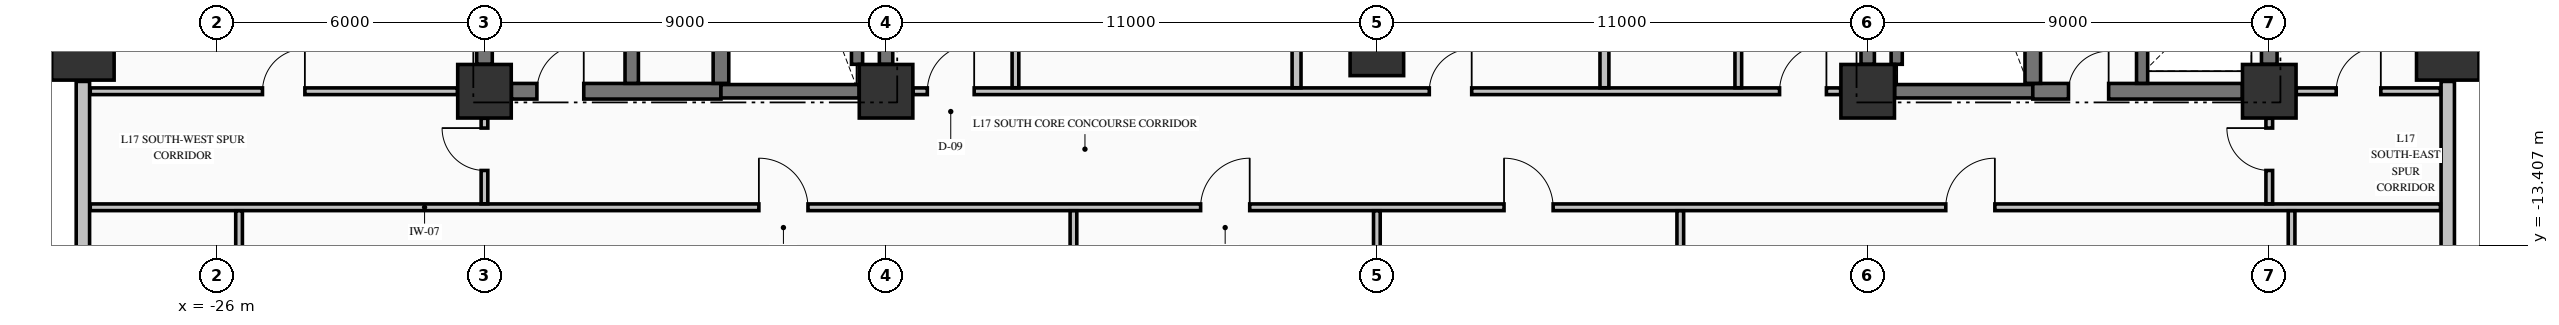
"""IFC4 building model, lengths in metres.
Left out: names, types, materials, properties, quantities, classifications, styles, units other than length and angle.
Written with IfcOpenShell. Run it as: python <this file> out.ifc"""

import sys

from ifc_helpers import new_model, si_unit, direction, frame, frame_2d, origin, origin_2d, place, context, subcontext, project, spatial, rectangle, extrude, element, fill, save


model = new_model("IFC4")
c1 = context("Model", 3, precision=1e-05, world=origin(), true_north=direction((0.0, 1.0)))
c2 = subcontext(c1, "Body", "Model", "MODEL_VIEW")
j1 = project(units=[si_unit("LENGTHUNIT", "METRE"), si_unit("PLANEANGLEUNIT", "RADIAN")], contexts=[c1])
p1 = place(None, origin())
s1 = spatial("IfcSite", under=j1, at=p1, CompositionType="ELEMENT")
p2 = place(p1, origin())
s2 = spatial("IfcBuilding", under=s1, at=p2, CompositionType="ELEMENT")
p3 = place(p2, frame((0.0, 0.0, 71.47)))
s3 = spatial("IfcBuildingStorey", under=s2, at=p3, CompositionType="ELEMENT", Elevation=71.47)
for number, where, z_axis, x_axis in (
    (1, (-29.0, -9.0, -0.325), (0.0, 0.0, 1.0), (1.0, 0.0, 0.0)),
    (2, (24.0, -9.0, -0.325), (0.0, 0.0, 1.0), (1.0, 0.0, 0.0)),
):
    element("IfcColumn", number, at=place(p3, frame(where, z_axis=z_axis, x_axis=x_axis)), inside=s3, PredefinedType="COLUMN", context=c2, shape_type="SweptSolid", body=[
        extrude(rectangle(XDim=1.4, YDim=1.4, at=origin_2d()), origin(), (0.0, 0.0, 1.0), 3.645),
    ])
for number, where, z_axis, x_axis in (
    (3, (-20.0, -9.95, -0.325), (0.0, 0.0, 1.0), (1.0, 0.0, 0.0)),
    (4, (-11.0, -9.95, -0.325), (0.0, 0.0, 1.0), (1.0, 0.0, 0.0)),
    (5, (11.0, -9.95, -0.325), (0.0, 0.0, 1.0), (1.0, 0.0, 0.0)),
    (6, (20.0, -9.95, -0.325), (0.0, 0.0, 1.0), (1.0, 0.0, 0.0)),
    (7, (0.0, -9.0, -0.325), (0.0, 0.0, 1.0), (1.0, 0.0, 0.0)),
):
    element("IfcColumn", number, at=place(p3, frame(where, z_axis=z_axis, x_axis=x_axis)), inside=s3, PredefinedType="COLUMN", context=c2, shape_type="SweptSolid", body=[
        extrude(rectangle(XDim=1.2, YDim=1.2, at=origin_2d()), origin(), (0.0, 0.0, 1.0), 3.645),
    ])
for number, where, z_axis, x_axis in (
    (8, (24.0, -22.27, 0.0), (0.0, 0.0, 1.0), (0.0, 1.0, 0.0)),
    (9, (-29.0, -9.73, 0.0), (0.0, 0.0, 1.0), (0.0, -1.0, 0.0)),
):
    element("IfcWall", number, at=place(p3, frame(where, z_axis=z_axis, x_axis=x_axis)), inside=s3, PredefinedType="STANDARD", context=c2, shape_type="SweptSolid", body=[
        extrude(rectangle(XDim=12.54, YDim=0.3, at=frame_2d((6.27, 0.0))), origin(), (0.0, 0.0, 1.0), 2.712),
    ])
p4 = place(p3, frame((-19.396, -9.95, 0.0), z_axis=(0.0, 0.0, 1.0), x_axis=(1.0, 0.0, 0.0)))
e10 = element("IfcWall", 10, at=p4, inside=s3, PredefinedType="SHEAR", context=c2, shape_type="SweptSolid", body=[
    extrude(rectangle(XDim=4.696, YDim=0.35, at=frame_2d((2.348, 0.0))), origin(), (0.0, 0.0, 1.0), 3.32),
])
p5 = place(p4, frame((0.571, 0.0, 0.0)))
e11 = element("IfcOpeningElement", 11, at=p5, cuts=e10, PredefinedType="OPENING", context=c2, shape_type="SweptSolid", body=[
    extrude(rectangle(XDim=1.05, YDim=2.15, at=frame_2d((0.525, 1.075))), frame((0.0, 0.185, 0.0), z_axis=(0.0, -1.0, 0.0), x_axis=(1.0, 0.0, 0.0)), (0.0, 0.0, 1.0), 0.37),
])
for number, where, z_axis, x_axis in (
    (12, (-14.7, -9.95, 0.0), (0.0, 0.0, 1.0), (1.0, 0.0, 0.0)),
    (13, (11.604, -9.95, 0.0), (0.0, 0.0, 1.0), (1.0, 0.0, 0.0)),
):
    element("IfcWall", number, at=place(p3, frame(where, z_axis=z_axis, x_axis=x_axis)), inside=s3, PredefinedType="SHEAR", context=c2, shape_type="SweptSolid", body=[
        extrude(rectangle(XDim=3.096, YDim=0.3, at=frame_2d((1.548, 0.0))), origin(), (0.0, 0.0, 1.0), 3.32),
    ])
p6 = place(p3, frame((14.7, -9.95, 0.0), z_axis=(0.0, 0.0, 1.0), x_axis=(1.0, 0.0, 0.0)))
e14 = element("IfcWall", 14, at=p6, inside=s3, PredefinedType="SHEAR", context=c2, shape_type="SweptSolid", body=[
    extrude(rectangle(XDim=4.696, YDim=0.35, at=frame_2d((2.348, 0.0))), origin(), (0.0, 0.0, 1.0), 3.32),
])
p7 = place(p6, frame((0.8, 0.0, 0.0)))
e15 = element("IfcOpeningElement", 15, at=p7, cuts=e14, PredefinedType="OPENING", context=c2, shape_type="SweptSolid", body=[
    extrude(rectangle(XDim=0.9, YDim=2.15, at=frame_2d((0.45, 1.075))), frame((0.0, 0.185, 0.0), z_axis=(0.0, -1.0, 0.0), x_axis=(1.0, 0.0, 0.0)), (0.0, 0.0, 1.0), 0.37),
])
p8 = place(p3, frame((-28.835, -12.55, 0.0), z_axis=(0.0, 0.0, 1.0), x_axis=(1.0, 0.0, 0.0)))
e16 = element("IfcWall", 16, at=p8, inside=s3, PredefinedType="PARTITIONING", context=c2, shape_type="SweptSolid", body=[
    extrude(rectangle(XDim=52.67, YDim=0.15, at=frame_2d((26.335, 0.0))), origin(), (0.0, 0.0, 1.0), 3.32),
])
p9 = place(p8, frame((14.985, 0.0, 0.0)))
e17 = element("IfcOpeningElement", 17, at=p9, cuts=e16, PredefinedType="OPENING", context=c2, shape_type="SweptSolid", body=[
    extrude(rectangle(XDim=1.1, YDim=2.15, at=frame_2d((0.55, 1.075))), frame((0.0, 0.085, 0.0), z_axis=(0.0, -1.0, 0.0), x_axis=(1.0, 0.0, 0.0)), (0.0, 0.0, 1.0), 0.17),
])
p10 = place(p8, frame((24.885, 0.0, 0.0)))
e18 = element("IfcOpeningElement", 18, at=p10, cuts=e16, PredefinedType="OPENING", context=c2, shape_type="SweptSolid", body=[
    extrude(rectangle(XDim=1.1, YDim=2.15, at=frame_2d((0.55, 1.075))), frame((0.0, 0.085, 0.0), z_axis=(0.0, -1.0, 0.0), x_axis=(1.0, 0.0, 0.0)), (0.0, 0.0, 1.0), 0.17),
])
p11 = place(p8, frame((31.685, 0.0, 0.0)))
e19 = element("IfcOpeningElement", 19, at=p11, cuts=e16, PredefinedType="OPENING", context=c2, shape_type="SweptSolid", body=[
    extrude(rectangle(XDim=1.1, YDim=2.15, at=frame_2d((0.55, 1.075))), frame((0.0, 0.085, 0.0), z_axis=(0.0, -1.0, 0.0), x_axis=(1.0, 0.0, 0.0)), (0.0, 0.0, 1.0), 0.17),
])
p12 = place(p8, frame((41.585, 0.0, 0.0)))
e20 = element("IfcOpeningElement", 20, at=p12, cuts=e16, PredefinedType="OPENING", context=c2, shape_type="SweptSolid", body=[
    extrude(rectangle(XDim=1.1, YDim=2.15, at=frame_2d((0.55, 1.075))), frame((0.0, 0.085, 0.0), z_axis=(0.0, -1.0, 0.0), x_axis=(1.0, 0.0, 0.0)), (0.0, 0.0, 1.0), 0.17),
])
p13 = place(p3, frame((-28.835, -9.95, 0.0), z_axis=(0.0, 0.0, 1.0), x_axis=(1.0, 0.0, 0.0)))
e21 = element("IfcWall", 21, at=p13, inside=s3, PredefinedType="PARTITIONING", context=c2, shape_type="SweptSolid", body=[
    extrude(rectangle(XDim=8.229, YDim=0.15, at=frame_2d((4.115, 0.0))), origin(), (0.0, 0.0, 1.0), 3.32),
])
p14 = place(p13, frame((3.86, 0.0, 0.0)))
e22 = element("IfcOpeningElement", 22, at=p14, cuts=e21, PredefinedType="OPENING", context=c2, shape_type="SweptSolid", body=[
    extrude(rectangle(XDim=0.95, YDim=2.15, at=frame_2d((0.475, 1.075))), frame((0.0, 0.085, 0.0), z_axis=(0.0, -1.0, 0.0), x_axis=(1.0, 0.0, 0.0)), (0.0, 0.0, 1.0), 0.17),
])
p15 = place(p3, frame((-10.394, -9.95, 0.0), z_axis=(0.0, 0.0, 1.0), x_axis=(1.0, 0.0, 0.0)))
e23 = element("IfcWall", 23, at=p15, inside=s3, PredefinedType="PARTITIONING", context=c2, shape_type="SweptSolid", body=[
    extrude(rectangle(XDim=20.788, YDim=0.15, at=frame_2d((10.394, 0.0))), origin(), (0.0, 0.0, 1.0), 3.32),
])
p16 = place(p15, frame((0.319, 0.0, 0.0)))
e24 = element("IfcOpeningElement", 24, at=p16, cuts=e23, PredefinedType="OPENING", context=c2, shape_type="SweptSolid", body=[
    extrude(rectangle(XDim=1.05, YDim=2.15, at=frame_2d((0.525, 1.075))), frame((0.0, 0.085, 0.0), z_axis=(0.0, -1.0, 0.0), x_axis=(1.0, 0.0, 0.0)), (0.0, 0.0, 1.0), 0.17),
])
p17 = place(p15, frame((19.419, 0.0, 0.0)))
e25 = element("IfcOpeningElement", 25, at=p17, cuts=e23, PredefinedType="OPENING", context=c2, shape_type="SweptSolid", body=[
    extrude(rectangle(XDim=1.05, YDim=2.15, at=frame_2d((0.525, 1.075))), frame((0.0, 0.085, 0.0), z_axis=(0.0, -1.0, 0.0), x_axis=(1.0, 0.0, 0.0)), (0.0, 0.0, 1.0), 0.17),
])
p18 = place(p15, frame((11.569, 0.0, 0.0)))
e26 = element("IfcOpeningElement", 26, at=p18, cuts=e23, PredefinedType="OPENING", context=c2, shape_type="SweptSolid", body=[
    extrude(rectangle(XDim=0.95, YDim=2.15, at=frame_2d((0.475, 1.075))), frame((0.0, 0.085, 0.0), z_axis=(0.0, -1.0, 0.0), x_axis=(1.0, 0.0, 0.0)), (0.0, 0.0, 1.0), 0.17),
])
p19 = place(p3, frame((20.606, -9.95, 0.0), z_axis=(0.0, 0.0, 1.0), x_axis=(1.0, 0.0, 0.0)))
e27 = element("IfcWall", 27, at=p19, inside=s3, PredefinedType="PARTITIONING", context=c2, shape_type="SweptSolid", body=[
    extrude(rectangle(XDim=3.229, YDim=0.15, at=frame_2d((1.615, 0.0))), origin(), (0.0, 0.0, 1.0), 3.32),
])
p20 = place(p19, frame((0.894, 0.0, 0.0)))
e28 = element("IfcOpeningElement", 28, at=p20, cuts=e27, PredefinedType="OPENING", context=c2, shape_type="SweptSolid", body=[
    extrude(rectangle(XDim=1.0, YDim=2.15, at=frame_2d((0.5, 1.075))), frame((0.0, 0.085, 0.0), z_axis=(0.0, -1.0, 0.0), x_axis=(1.0, 0.0, 0.0)), (0.0, 0.0, 1.0), 0.17),
])
p21 = place(p3, frame((-20.0, -9.346, 0.0), z_axis=(0.0, 0.0, 1.0), x_axis=(0.0, 1.0, 0.0)))
e29 = element("IfcWall", 29, at=p21, inside=s3, PredefinedType="SHEAR", context=c2, shape_type="SweptSolid", body=[
    extrude(rectangle(XDim=8.742, YDim=0.35, at=frame_2d((4.371, 0.0))), origin(), (0.0, 0.0, 1.0), 3.32),
])
p22 = place(p3, frame((-16.7, -9.773, 0.0), z_axis=(0.0, 0.0, 1.0), x_axis=(0.0, 1.0, 0.0)))
e30 = element("IfcWall", 30, at=p22, inside=s3, PredefinedType="SHEAR", context=c2, shape_type="SweptSolid", body=[
    extrude(rectangle(XDim=9.371, YDim=0.3, at=frame_2d((4.686, 0.0))), origin(), (0.0, 0.0, 1.0), 3.32),
])
p23 = place(p3, frame((-14.7, -9.773, 0.0), z_axis=(0.0, 0.0, 1.0), x_axis=(0.0, 1.0, 0.0)))
e31 = element("IfcWall", 31, at=p23, inside=s3, PredefinedType="SHEAR", context=c2, shape_type="SweptSolid", body=[
    extrude(rectangle(XDim=9.371, YDim=0.35, at=frame_2d((4.686, 0.0))), origin(), (0.0, 0.0, 1.0), 3.32),
])
p24 = place(p3, frame((-11.65, -9.346, 0.0), z_axis=(0.0, 0.0, 1.0), x_axis=(0.0, 1.0, 0.0)))
e32 = element("IfcWall", 32, at=p24, inside=s3, PredefinedType="SOLIDWALL", context=c2, shape_type="SweptSolid", body=[
    extrude(rectangle(XDim=8.742, YDim=0.25, at=frame_2d((4.371, 0.0))), origin(), (0.0, 0.0, 1.0), 3.32),
])
for number, where, z_axis, x_axis in (
    (33, (-11.0, -9.346, 0.0), (0.0, 0.0, 1.0), (0.0, 1.0, 0.0)),
    (34, (11.0, -9.346, 0.0), (0.0, 0.0, 1.0), (0.0, 1.0, 0.0)),
):
    element("IfcWall", number, at=place(p3, frame(where, z_axis=z_axis, x_axis=x_axis)), inside=s3, PredefinedType="SHEAR", context=c2, shape_type="SweptSolid", body=[
        extrude(rectangle(XDim=8.742, YDim=0.3, at=frame_2d((4.371, 0.0))), origin(), (0.0, 0.0, 1.0), 3.32),
    ])
p25 = place(p3, frame((11.65, -9.346, 0.0), z_axis=(0.0, 0.0, 1.0), x_axis=(0.0, 1.0, 0.0)))
e35 = element("IfcWall", 35, at=p25, inside=s3, PredefinedType="SOLIDWALL", context=c2, shape_type="SweptSolid", body=[
    extrude(rectangle(XDim=8.742, YDim=0.25, at=frame_2d((4.371, 0.0))), origin(), (0.0, 0.0, 1.0), 3.32),
])
p26 = place(p3, frame((14.7, -9.773, 0.0), z_axis=(0.0, 0.0, 1.0), x_axis=(0.0, 1.0, 0.0)))
e36 = element("IfcWall", 36, at=p26, inside=s3, PredefinedType="SHEAR", context=c2, shape_type="SweptSolid", body=[
    extrude(rectangle(XDim=9.371, YDim=0.35, at=frame_2d((4.686, 0.0))), origin(), (0.0, 0.0, 1.0), 3.32),
])
p27 = place(p3, frame((17.15, -9.773, 0.0), z_axis=(0.0, 0.0, 1.0), x_axis=(0.0, 1.0, 0.0)))
e37 = element("IfcWall", 37, at=p27, inside=s3, PredefinedType="SOLIDWALL", context=c2, shape_type="SweptSolid", body=[
    extrude(rectangle(XDim=2.596, YDim=0.25, at=frame_2d((1.298, 0.0))), origin(), (0.0, 0.0, 1.0), 3.32),
])
p28 = place(p3, frame((20.0, -9.346, 0.0), z_axis=(0.0, 0.0, 1.0), x_axis=(0.0, 1.0, 0.0)))
e38 = element("IfcWall", 38, at=p28, inside=s3, PredefinedType="SHEAR", context=c2, shape_type="SweptSolid", body=[
    extrude(rectangle(XDim=2.169, YDim=0.35, at=frame_2d((1.084, 0.0))), origin(), (0.0, 0.0, 1.0), 3.32),
])
p29 = place(p3, frame((-25.5, -22.294, 0.0), z_axis=(0.0, 0.0, 1.0), x_axis=(0.0, 1.0, 0.0)))
e39 = element("IfcWall", 39, at=p29, inside=s3, PredefinedType="PARTITIONING", context=c2, shape_type="SweptSolid", body=[
    extrude(rectangle(XDim=9.666, YDim=0.15, at=frame_2d((4.833, 0.0))), origin(), (0.0, 0.0, 1.0), 3.32),
])
p30 = place(p3, frame((-20.0, -12.472, 0.0), z_axis=(0.0, 0.0, 1.0), x_axis=(0.0, 1.0, 0.0)))
e40 = element("IfcWall", 40, at=p30, inside=s3, PredefinedType="PARTITIONING", context=c2, shape_type="SweptSolid", body=[
    extrude(rectangle(XDim=1.916, YDim=0.15, at=frame_2d((0.958, 0.0))), origin(), (0.0, 0.0, 1.0), 2.66),
])
p31 = place(p30, frame((0.747, 0.0, 0.0)))
e41 = element("IfcOpeningElement", 41, at=p31, cuts=e40, PredefinedType="OPENING", context=c2, shape_type="SweptSolid", body=[
    extrude(rectangle(XDim=0.95, YDim=2.15, at=frame_2d((0.475, 1.075))), frame((0.0, 0.085, 0.0), z_axis=(0.0, -1.0, 0.0), x_axis=(1.0, 0.0, 0.0)), (0.0, 0.0, 1.0), 0.17),
])
p32 = place(p3, frame((-8.1, -9.872, 0.0), z_axis=(0.0, 0.0, 1.0), x_axis=(0.0, 1.0, 0.0)))
e42 = element("IfcWall", 42, at=p32, inside=s3, PredefinedType="PARTITIONING", context=c2, shape_type="SweptSolid", body=[
    extrude(rectangle(XDim=6.569, YDim=0.15, at=frame_2d((3.285, 0.0))), origin(), (0.0, 0.0, 1.0), 3.32),
])
p33 = place(p32, frame((2.827, 0.0, 0.0)))
e43 = element("IfcOpeningElement", 43, at=p33, cuts=e42, PredefinedType="OPENING", context=c2, shape_type="SweptSolid", body=[
    extrude(rectangle(XDim=0.95, YDim=2.15, at=frame_2d((0.475, 1.075))), frame((0.0, 0.085, 0.0), z_axis=(0.0, -1.0, 0.0), x_axis=(1.0, 0.0, 0.0)), (0.0, 0.0, 1.0), 0.17),
])
p34 = place(p3, frame((-6.8, -26.335, 0.0), z_axis=(0.0, 0.0, 1.0), x_axis=(0.0, 1.0, 0.0)))
e44 = element("IfcWall", 44, at=p34, inside=s3, PredefinedType="PARTITIONING", context=c2, shape_type="SweptSolid", body=[
    extrude(rectangle(XDim=13.707, YDim=0.15, at=frame_2d((6.854, 0.0))), origin(), (0.0, 0.0, 1.0), 3.32),
])
p35 = place(p3, frame((-1.8, -9.872, 0.0), z_axis=(0.0, 0.0, 1.0), x_axis=(0.0, 1.0, 0.0)))
e45 = element("IfcWall", 45, at=p35, inside=s3, PredefinedType="PARTITIONING", context=c2, shape_type="SweptSolid", body=[
    extrude(rectangle(XDim=4.969, YDim=0.2, at=frame_2d((2.484, 0.0))), origin(), (0.0, 0.0, 1.0), 3.32),
])
p36 = place(p3, frame((0.0, -25.794, 0.0), z_axis=(0.0, 0.0, 1.0), x_axis=(0.0, 1.0, 0.0)))
e46 = element("IfcWall", 46, at=p36, inside=s3, PredefinedType="PARTITIONING", context=c2, shape_type="SweptSolid", body=[
    extrude(rectangle(XDim=13.166, YDim=0.15, at=frame_2d((6.583, 0.0))), origin(), (0.0, 0.0, 1.0), 3.32),
])
p37 = place(p3, frame((5.1, -9.872, 0.0), z_axis=(0.0, 0.0, 1.0), x_axis=(0.0, 1.0, 0.0)))
e47 = element("IfcWall", 47, at=p37, inside=s3, PredefinedType="PARTITIONING", context=c2, shape_type="SweptSolid", body=[
    extrude(rectangle(XDim=4.969, YDim=0.2, at=frame_2d((2.484, 0.0))), origin(), (0.0, 0.0, 1.0), 3.32),
])
p38 = place(p3, frame((6.8, -26.44, 0.0), z_axis=(0.0, 0.0, 1.0), x_axis=(0.0, 1.0, 0.0)))
e48 = element("IfcWall", 48, at=p38, inside=s3, PredefinedType="PARTITIONING", context=c2, shape_type="SweptSolid", body=[
    extrude(rectangle(XDim=13.812, YDim=0.15, at=frame_2d((6.906, 0.0))), origin(), (0.0, 0.0, 1.0), 3.32),
])
p39 = place(p3, frame((8.1, -9.872, 0.0), z_axis=(0.0, 0.0, 1.0), x_axis=(0.0, 1.0, 0.0)))
e49 = element("IfcWall", 49, at=p39, inside=s3, PredefinedType="PARTITIONING", context=c2, shape_type="SweptSolid", body=[
    extrude(rectangle(XDim=4.969, YDim=0.15, at=frame_2d((2.484, 0.0))), origin(), (0.0, 0.0, 1.0), 3.32),
])
p40 = place(p39, frame((1.997, 0.0, 0.0)))
e50 = element("IfcOpeningElement", 50, at=p40, cuts=e49, PredefinedType="OPENING", context=c2, shape_type="SweptSolid", body=[
    extrude(rectangle(XDim=0.95, YDim=2.15, at=frame_2d((0.475, 1.075))), frame((0.0, 0.085, 0.0), z_axis=(0.0, -1.0, 0.0), x_axis=(1.0, 0.0, 0.0)), (0.0, 0.0, 1.0), 0.17),
])
p41 = place(p3, frame((20.0, -12.472, 0.0), z_axis=(0.0, 0.0, 1.0), x_axis=(0.0, 1.0, 0.0)))
e51 = element("IfcWall", 51, at=p41, inside=s3, PredefinedType="PARTITIONING", context=c2, shape_type="SweptSolid", body=[
    extrude(rectangle(XDim=1.916, YDim=0.15, at=frame_2d((0.958, 0.0))), origin(), (0.0, 0.0, 1.0), 3.32),
])
p42 = place(p41, frame((0.747, 0.0, 0.0)))
e52 = element("IfcOpeningElement", 52, at=p42, cuts=e51, PredefinedType="OPENING", context=c2, shape_type="SweptSolid", body=[
    extrude(rectangle(XDim=0.95, YDim=2.15, at=frame_2d((0.475, 1.075))), frame((0.0, 0.085, 0.0), z_axis=(0.0, -1.0, 0.0), x_axis=(1.0, 0.0, 0.0)), (0.0, 0.0, 1.0), 0.17),
])
p43 = place(p3, frame((20.5, -22.294, 0.0), z_axis=(0.0, 0.0, 1.0), x_axis=(0.0, 1.0, 0.0)))
e53 = element("IfcWall", 53, at=p43, inside=s3, PredefinedType="PARTITIONING", context=c2, shape_type="SweptSolid", body=[
    extrude(rectangle(XDim=9.666, YDim=0.15, at=frame_2d((4.833, 0.0))), origin(), (0.0, 0.0, 1.0), 3.32),
])
p44 = place(p5, origin())
e54 = element("IfcDoor", 54, at=p44, inside=s3, OperationType="SINGLE_SWING_RIGHT", PredefinedType="DOOR", context=c2, shape_type="SweptSolid", body=[
    extrude(rectangle(XDim=1.05, YDim=2.15, at=frame_2d((0.525, 1.075))), frame((0.0, 0.025, 0.0), z_axis=(0.0, -1.0, 0.0), x_axis=(1.0, 0.0, 0.0)), (0.0, 0.0, 1.0), 0.05),
])
fill(e11, e54)
p45 = place(p7, origin())
e55 = element("IfcDoor", 55, at=p45, inside=s3, OperationType="SINGLE_SWING_RIGHT", PredefinedType="DOOR", context=c2, shape_type="SweptSolid", body=[
    extrude(rectangle(XDim=0.9, YDim=2.15, at=frame_2d((0.45, 1.075))), frame((0.0, 0.025, 0.0), z_axis=(0.0, -1.0, 0.0), x_axis=(1.0, 0.0, 0.0)), (0.0, 0.0, 1.0), 0.05),
])
fill(e15, e55)
p46 = place(p16, origin())
e56 = element("IfcDoor", 56, at=p46, inside=s3, OperationType="SINGLE_SWING_RIGHT", PredefinedType="DOOR", context=c2, shape_type="SweptSolid", body=[
    extrude(rectangle(XDim=1.05, YDim=2.15, at=frame_2d((0.525, 1.075))), frame((0.0, 0.025, 0.0), z_axis=(0.0, -1.0, 0.0), x_axis=(1.0, 0.0, 0.0)), (0.0, 0.0, 1.0), 0.05),
])
fill(e24, e56)
p47 = place(p17, origin())
e57 = element("IfcDoor", 57, at=p47, inside=s3, OperationType="SINGLE_SWING_RIGHT", PredefinedType="DOOR", context=c2, shape_type="SweptSolid", body=[
    extrude(rectangle(XDim=1.05, YDim=2.15, at=frame_2d((0.525, 1.075))), frame((0.0, 0.025, 0.0), z_axis=(0.0, -1.0, 0.0), x_axis=(1.0, 0.0, 0.0)), (0.0, 0.0, 1.0), 0.05),
])
fill(e25, e57)
p48 = place(p9, origin())
e58 = element("IfcDoor", 58, at=p48, inside=s3, OperationType="SINGLE_SWING_LEFT", PredefinedType="DOOR", context=c2, shape_type="SweptSolid", body=[
    extrude(rectangle(XDim=1.1, YDim=2.15, at=frame_2d((0.55, 1.075))), frame((0.0, 0.025, 0.0), z_axis=(0.0, -1.0, 0.0), x_axis=(1.0, 0.0, 0.0)), (0.0, 0.0, 1.0), 0.05),
])
fill(e17, e58)
p49 = place(p10, origin())
e59 = element("IfcDoor", 59, at=p49, inside=s3, OperationType="SINGLE_SWING_RIGHT", PredefinedType="DOOR", context=c2, shape_type="SweptSolid", body=[
    extrude(rectangle(XDim=1.1, YDim=2.15, at=frame_2d((0.55, 1.075))), frame((0.0, 0.025, 0.0), z_axis=(0.0, -1.0, 0.0), x_axis=(1.0, 0.0, 0.0)), (0.0, 0.0, 1.0), 0.05),
])
fill(e18, e59)
p50 = place(p11, origin())
e60 = element("IfcDoor", 60, at=p50, inside=s3, OperationType="SINGLE_SWING_LEFT", PredefinedType="DOOR", context=c2, shape_type="SweptSolid", body=[
    extrude(rectangle(XDim=1.1, YDim=2.15, at=frame_2d((0.55, 1.075))), frame((0.0, 0.025, 0.0), z_axis=(0.0, -1.0, 0.0), x_axis=(1.0, 0.0, 0.0)), (0.0, 0.0, 1.0), 0.05),
])
fill(e19, e60)
p51 = place(p12, origin())
e61 = element("IfcDoor", 61, at=p51, inside=s3, OperationType="SINGLE_SWING_RIGHT", PredefinedType="DOOR", context=c2, shape_type="SweptSolid", body=[
    extrude(rectangle(XDim=1.1, YDim=2.15, at=frame_2d((0.55, 1.075))), frame((0.0, 0.025, 0.0), z_axis=(0.0, -1.0, 0.0), x_axis=(1.0, 0.0, 0.0)), (0.0, 0.0, 1.0), 0.05),
])
fill(e20, e61)
p52 = place(p18, origin())
e62 = element("IfcDoor", 62, at=p52, inside=s3, OperationType="SINGLE_SWING_RIGHT", PredefinedType="DOOR", context=c2, shape_type="SweptSolid", body=[
    extrude(rectangle(XDim=0.95, YDim=2.15, at=frame_2d((0.475, 1.075))), frame((0.0, 0.025, 0.0), z_axis=(0.0, -1.0, 0.0), x_axis=(1.0, 0.0, 0.0)), (0.0, 0.0, 1.0), 0.05),
])
fill(e26, e62)
p53 = place(p31, origin())
e63 = element("IfcDoor", 63, at=p53, inside=s3, OperationType="SINGLE_SWING_RIGHT", PredefinedType="DOOR", context=c2, shape_type="SweptSolid", body=[
    extrude(rectangle(XDim=0.95, YDim=2.15, at=frame_2d((0.475, 1.075))), frame((0.0, 0.025, 0.0), z_axis=(0.0, -1.0, 0.0), x_axis=(1.0, 0.0, 0.0)), (0.0, 0.0, 1.0), 0.05),
])
fill(e41, e63)
p54 = place(p14, origin())
e64 = element("IfcDoor", 64, at=p54, inside=s3, OperationType="SINGLE_SWING_RIGHT", PredefinedType="DOOR", context=c2, shape_type="SweptSolid", body=[
    extrude(rectangle(XDim=0.95, YDim=2.15, at=frame_2d((0.475, 1.075))), frame((0.0, 0.025, 0.0), z_axis=(0.0, -1.0, 0.0), x_axis=(1.0, 0.0, 0.0)), (0.0, 0.0, 1.0), 0.05),
])
fill(e22, e64)
p55 = place(p42, origin())
e65 = element("IfcDoor", 65, at=p55, inside=s3, OperationType="SINGLE_SWING_RIGHT", PredefinedType="DOOR", context=c2, shape_type="SweptSolid", body=[
    extrude(rectangle(XDim=0.95, YDim=2.15, at=frame_2d((0.475, 1.075))), frame((0.0, 0.025, 0.0), z_axis=(0.0, -1.0, 0.0), x_axis=(1.0, 0.0, 0.0)), (0.0, 0.0, 1.0), 0.05),
])
fill(e52, e65)
p56 = place(p20, origin())
e66 = element("IfcDoor", 66, at=p56, inside=s3, OperationType="SINGLE_SWING_RIGHT", PredefinedType="DOOR", context=c2, shape_type="SweptSolid", body=[
    extrude(rectangle(XDim=1.0, YDim=2.15, at=frame_2d((0.5, 1.075))), frame((0.0, 0.025, 0.0), z_axis=(0.0, -1.0, 0.0), x_axis=(1.0, 0.0, 0.0)), (0.0, 0.0, 1.0), 0.05),
])
fill(e28, e66)
save(model, sys.argv[1])
